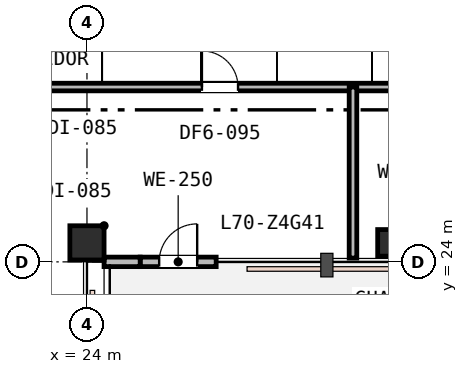
"""IFC4 building model, lengths in metres.
Left out: names, types, materials, properties, quantities, classifications, styles, units other than length and angle.
Written with IfcOpenShell. Run it as: python <this file> out.ifc"""

import sys

from ifc_helpers import new_model, si_unit, direction, frame, frame_2d, origin, origin_2d, place, context, subcontext, project, spatial, rectangle, extrude, element, fill, save


model = new_model("IFC4")
c1 = context("Model", 3, precision=1e-05, world=origin(), true_north=direction((0.0, 1.0)))
c2 = subcontext(c1, "Body", "Model", "MODEL_VIEW")
j1 = project(units=[si_unit("LENGTHUNIT", "METRE"), si_unit("PLANEANGLEUNIT", "RADIAN")], contexts=[c1])
p1 = place(None, origin())
s1 = spatial("IfcSite", under=j1, at=p1, CompositionType="ELEMENT")
p2 = place(p1, origin())
s2 = spatial("IfcBuilding", under=s1, at=p2, CompositionType="ELEMENT")
p3 = place(p2, frame((0.0, 0.0, 271.6)))
s3 = spatial("IfcBuildingStorey", under=s2, at=p3, CompositionType="ELEMENT", Elevation=271.6)
p4 = place(p3, frame((24.0, 24.5, 0.0), z_axis=(0.0, 0.0, 1.0), x_axis=(1.0, 0.0, 0.0)))
e1 = element("IfcColumn", 1, at=p4, inside=s3, PredefinedType="COLUMN", context=c2, shape_type="SweptSolid", body=[
    extrude(rectangle(XDim=0.9, YDim=0.9, at=origin_2d()), origin(), (0.0, 0.0, 1.0), 3.8),
])
p5 = place(p3, frame((32.0, 24.5, 0.0), z_axis=(0.0, 0.0, 1.0), x_axis=(1.0, 0.0, 0.0)))
e2 = element("IfcColumn", 2, at=p5, inside=s3, PredefinedType="COLUMN", context=c2, shape_type="SweptSolid", body=[
    extrude(rectangle(XDim=0.7, YDim=0.7, at=origin_2d()), origin(), (0.0, 0.0, 1.0), 3.8),
])
p6 = place(p3, frame((25.4, 24.0, 0.0), z_axis=(0.0, 0.0, 1.0), x_axis=(1.0, 0.0, 0.0)))
e3 = element("IfcWall", 3, at=p6, inside=s3, PredefinedType="STANDARD", context=c2, shape_type="SweptSolid", body=[
    extrude(rectangle(XDim=2.0, YDim=0.25, at=frame_2d((1.0, 0.0))), origin(), (0.0, 0.0, 1.0), 3.27),
])
p7 = place(p6, frame((0.5, 0.0, 0.0)))
e4 = element("IfcOpeningElement", 4, at=p7, cuts=e3, PredefinedType="OPENING", context=c2, shape_type="SweptSolid", body=[
    extrude(rectangle(XDim=1.0, YDim=2.15, at=frame_2d((0.5, 1.075))), frame((0.0, 0.135, 0.0), z_axis=(0.0, -1.0, 0.0), x_axis=(1.0, 0.0, 0.0)), (0.0, 0.0, 1.0), 0.27),
])
p8 = place(p3, frame((24.45, 24.0, 0.0), z_axis=(0.0, 0.0, 1.0), x_axis=(1.0, 0.0, 0.0)))
e5 = element("IfcWall", 5, at=p8, inside=s3, PredefinedType="STANDARD", context=c2, shape_type="SweptSolid", body=[
    extrude(rectangle(XDim=0.95, YDim=0.25, at=frame_2d((0.475, 0.0))), origin(), (0.0, 0.0, 1.0), 3.27),
])
p9 = place(p3, frame((20.0, 28.6, 0.0), z_axis=(0.0, 0.0, 1.0), x_axis=(1.0, 0.0, 0.0)))
e6 = element("IfcWall", 6, at=p9, inside=s3, PredefinedType="PARTITIONING", context=c2, shape_type="SweptSolid", body=[
    extrude(rectangle(XDim=25.9, YDim=0.2, at=frame_2d((12.95, 0.0))), origin(), (0.0, 0.0, 1.0), 3.16),
])
p10 = place(p9, frame((7.025, 0.0, 0.0)))
e7 = element("IfcOpeningElement", 7, at=p10, cuts=e6, PredefinedType="OPENING", context=c2, shape_type="SweptSolid", body=[
    extrude(rectangle(XDim=0.95, YDim=2.15, at=frame_2d((0.475, 1.075))), frame((0.0, 0.11, 0.0), z_axis=(0.0, -1.0, 0.0), x_axis=(1.0, 0.0, 0.0)), (0.0, 0.0, 1.0), 0.22),
])
p11 = place(p9, frame((13.625, 0.0, 0.0)))
e8 = element("IfcOpeningElement", 8, at=p11, cuts=e6, PredefinedType="OPENING", context=c2, shape_type="SweptSolid", body=[
    extrude(rectangle(XDim=0.95, YDim=2.15, at=frame_2d((0.475, 1.075))), frame((0.0, 0.11, 0.0), z_axis=(0.0, -1.0, 0.0), x_axis=(1.0, 0.0, 0.0)), (0.0, 0.0, 1.0), 0.22),
])
p12 = place(p9, frame((18.378, 0.0, 0.0)))
e9 = element("IfcOpeningElement", 9, at=p12, cuts=e6, PredefinedType="OPENING", context=c2, shape_type="SweptSolid", body=[
    extrude(rectangle(XDim=0.95, YDim=2.15, at=frame_2d((0.475, 1.075))), frame((0.0, 0.11, 0.0), z_axis=(0.0, -1.0, 0.0), x_axis=(1.0, 0.0, 0.0)), (0.0, 0.0, 1.0), 0.22),
])
p13 = place(p3, frame((31.0, 24.1, 0.0), z_axis=(0.0, 0.0, 1.0), x_axis=(0.0, 1.0, 0.0)))
e10 = element("IfcWall", 10, at=p13, inside=s3, PredefinedType="PARTITIONING", context=c2, shape_type="SweptSolid", body=[
    extrude(rectangle(XDim=4.5, YDim=0.2, at=frame_2d((2.25, 0.0))), origin(), (0.0, 0.0, 1.0), 3.27),
])
p14 = place(p7, origin())
e11 = element("IfcDoor", 11, at=p14, inside=s3, OperationType="SINGLE_SWING_RIGHT", PredefinedType="DOOR", context=c2, shape_type="SweptSolid", body=[
    extrude(rectangle(XDim=1.0, YDim=2.15, at=frame_2d((0.5, 1.075))), frame((0.0, 0.025, 0.0), z_axis=(0.0, -1.0, 0.0), x_axis=(1.0, 0.0, 0.0)), (0.0, 0.0, 1.0), 0.05),
])
fill(e4, e11)
p15 = place(p10, origin())
e12 = element("IfcDoor", 12, at=p15, inside=s3, OperationType="SINGLE_SWING_LEFT", PredefinedType="DOOR", context=c2, shape_type="SweptSolid", body=[
    extrude(rectangle(XDim=0.95, YDim=2.15, at=frame_2d((0.475, 1.075))), frame((0.0, 0.025, 0.0), z_axis=(0.0, -1.0, 0.0), x_axis=(1.0, 0.0, 0.0)), (0.0, 0.0, 1.0), 0.05),
])
fill(e7, e12)
save(model, sys.argv[1])
